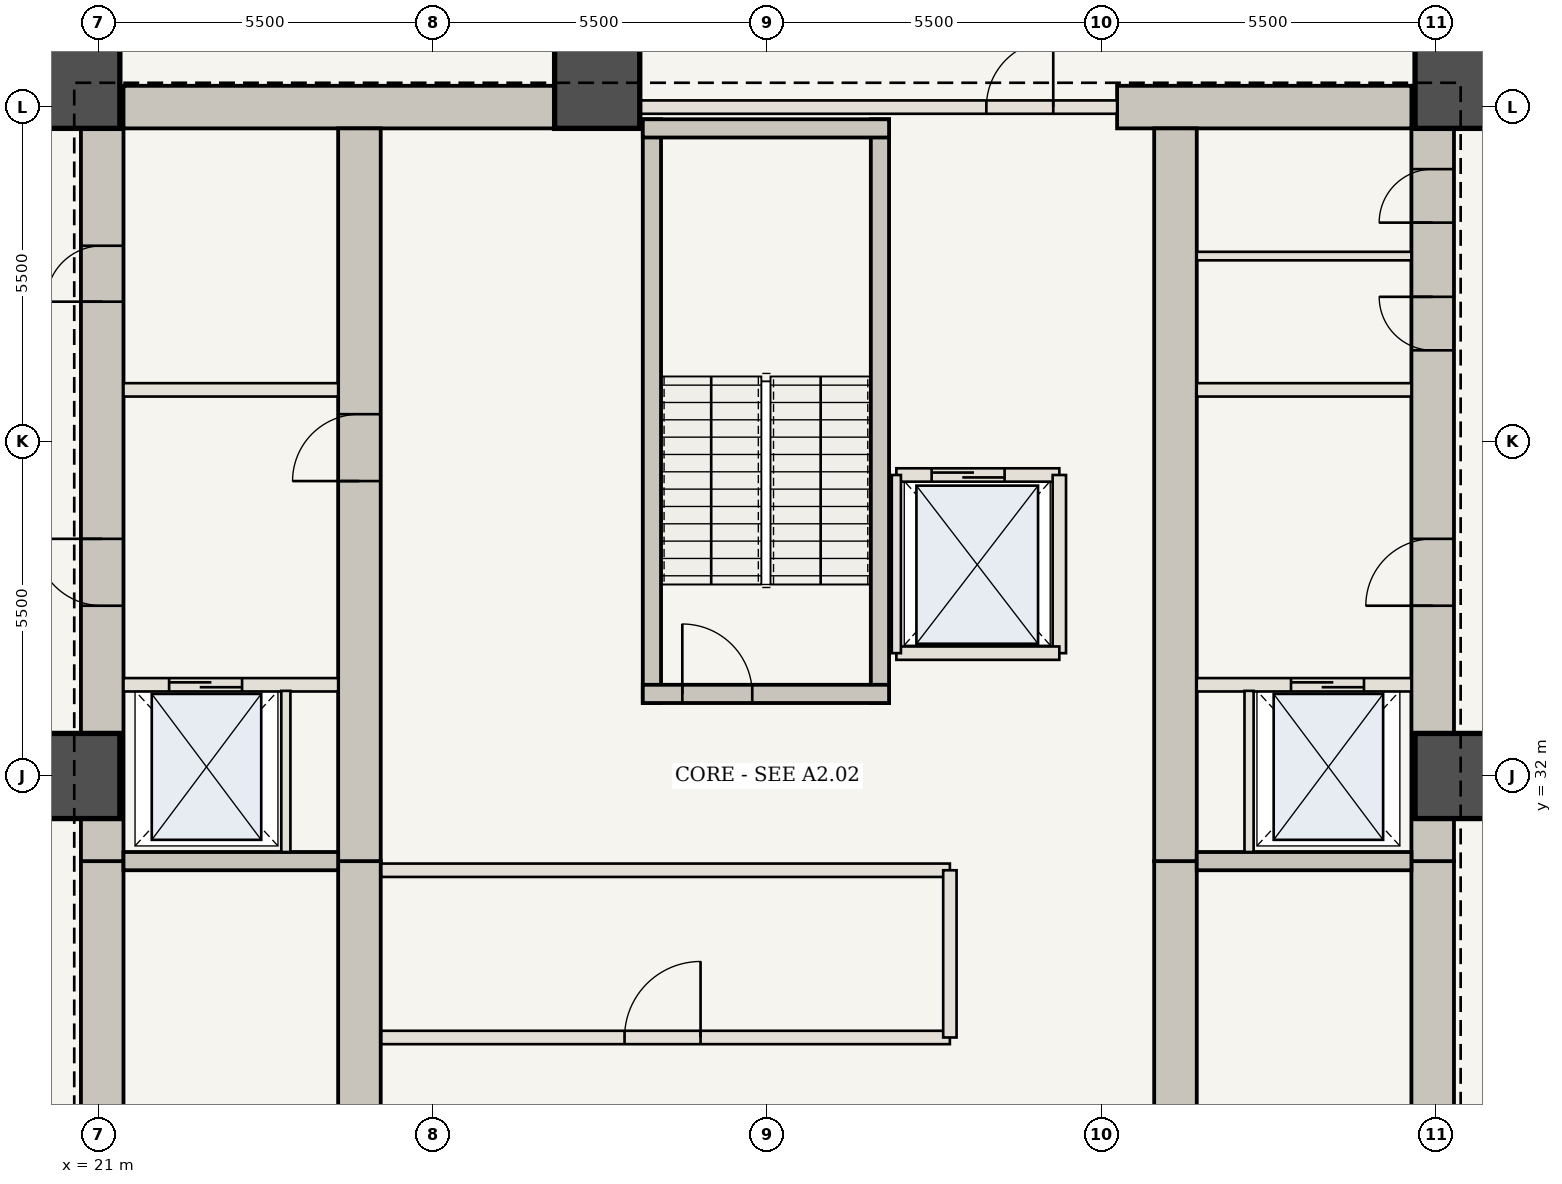
"""IFC4 building model, lengths in metres.
Left out: names, types, materials, properties, quantities, classifications, styles, units other than length and angle.
Written with IfcOpenShell. Run it as: python <this file> out.ifc"""

import sys

from ifc_helpers import new_model, si_unit, direction, frame, frame_2d, origin, origin_2d, place, context, subcontext, project, spatial, rectangle, extrude, element, fill, save


model = new_model("IFC4")
c1 = context("Model", 3, precision=1e-05, world=origin(), true_north=direction((0.0, 1.0)))
c2 = subcontext(c1, "Body", "Model", "MODEL_VIEW")
j1 = project(units=[si_unit("LENGTHUNIT", "METRE"), si_unit("PLANEANGLEUNIT", "RADIAN")], contexts=[c1])
p1 = place(None, origin())
s1 = spatial("IfcSite", under=j1, at=p1, CompositionType="ELEMENT")
p2 = place(p1, origin())
s2 = spatial("IfcBuilding", under=s1, at=p2, CompositionType="ELEMENT")
p3 = place(p2, frame((0.0, 0.0, -4.55)))
s3 = spatial("IfcBuildingStorey", under=s2, at=p3, CompositionType="ELEMENT", Elevation=-4.55)
p4 = place(p3, frame((21.06, 20.6, 0.0), z_axis=(0.0, 0.0, 1.0), x_axis=(0.0, 1.0, 0.0)))
e1 = element("IfcWall", 1, at=p4, inside=s3, PredefinedType="SHEAR", context=c2, shape_type="SweptSolid", body=[
    extrude(rectangle(XDim=10.0, YDim=0.7, at=frame_2d((5.0, 0.0))), origin(), (0.0, 0.0, 1.0), 4.55),
])
p5 = place(p4, frame((1.15, 0.0, 0.0)))
e2 = element("IfcOpeningElement", 2, at=p5, cuts=e1, PredefinedType="OPENING", context=c2, shape_type="SweptSolid", body=[
    extrude(rectangle(XDim=1.15, YDim=2.15, at=frame_2d((0.575, 1.075))), frame((0.0, 0.36, 0.0), z_axis=(0.0, -1.0, 0.0), x_axis=(1.0, 0.0, 0.0)), (0.0, 0.0, 1.0), 0.72),
])
p6 = place(p3, frame((21.06, 30.6, 0.0), z_axis=(0.0, 0.0, 1.0), x_axis=(0.0, 1.0, 0.0)))
e3 = element("IfcWall", 3, at=p6, inside=s3, PredefinedType="SHEAR", context=c2, shape_type="SweptSolid", body=[
    extrude(rectangle(XDim=12.75, YDim=0.7, at=frame_2d((6.375, 0.0))), origin(), (0.0, 0.0, 1.0), 4.55),
])
p7 = place(p6, frame((4.2, 0.0, 0.0)))
e4 = element("IfcOpeningElement", 4, at=p7, cuts=e3, PredefinedType="OPENING", context=c2, shape_type="SweptSolid", body=[
    extrude(rectangle(XDim=1.1, YDim=2.15, at=frame_2d((0.55, 1.075))), frame((0.0, 0.36, 0.0), z_axis=(0.0, -1.0, 0.0), x_axis=(1.0, 0.0, 0.0)), (0.0, 0.0, 1.0), 0.72),
])
p8 = place(p6, frame((9.2, 0.0, 0.0)))
e5 = element("IfcOpeningElement", 5, at=p8, cuts=e3, PredefinedType="OPENING", context=c2, shape_type="SweptSolid", body=[
    extrude(rectangle(XDim=0.92, YDim=2.1, at=frame_2d((0.46, 1.05))), frame((0.0, 0.36, 0.0), z_axis=(0.0, -1.0, 0.0), x_axis=(1.0, 0.0, 0.0)), (0.0, 0.0, 1.0), 0.72),
])
p9 = place(p3, frame((42.94, 20.6, 0.0), z_axis=(0.0, 0.0, 1.0), x_axis=(0.0, 1.0, 0.0)))
e6 = element("IfcWall", 6, at=p9, inside=s3, PredefinedType="SHEAR", context=c2, shape_type="SweptSolid", body=[
    extrude(rectangle(XDim=10.0, YDim=0.7, at=frame_2d((5.0, 0.0))), origin(), (0.0, 0.0, 1.0), 4.55),
])
p10 = place(p9, frame((1.15, 0.0, 0.0)))
e7 = element("IfcOpeningElement", 7, at=p10, cuts=e6, PredefinedType="OPENING", context=c2, shape_type="SweptSolid", body=[
    extrude(rectangle(XDim=1.15, YDim=2.15, at=frame_2d((0.575, 1.075))), frame((0.0, 0.36, 0.0), z_axis=(0.0, -1.0, 0.0), x_axis=(1.0, 0.0, 0.0)), (0.0, 0.0, 1.0), 0.72),
])
p11 = place(p3, frame((42.94, 30.6, 0.0), z_axis=(0.0, 0.0, 1.0), x_axis=(0.0, 1.0, 0.0)))
e8 = element("IfcWall", 8, at=p11, inside=s3, PredefinedType="SHEAR", context=c2, shape_type="SweptSolid", body=[
    extrude(rectangle(XDim=12.75, YDim=0.7, at=frame_2d((6.375, 0.0))), origin(), (0.0, 0.0, 1.0), 4.55),
])
p12 = place(p11, frame((4.2, 0.0, 0.0)))
e9 = element("IfcOpeningElement", 9, at=p12, cuts=e8, PredefinedType="OPENING", context=c2, shape_type="SweptSolid", body=[
    extrude(rectangle(XDim=1.1, YDim=2.15, at=frame_2d((0.55, 1.075))), frame((0.0, 0.36, 0.0), z_axis=(0.0, -1.0, 0.0), x_axis=(1.0, 0.0, 0.0)), (0.0, 0.0, 1.0), 0.72),
])
p13 = place(p11, frame((8.4, 0.0, 0.0)))
e10 = element("IfcOpeningElement", 10, at=p13, cuts=e8, PredefinedType="OPENING", context=c2, shape_type="SweptSolid", body=[
    extrude(rectangle(XDim=0.88, YDim=2.1, at=frame_2d((0.44, 1.05))), frame((0.0, 0.36, 0.0), z_axis=(0.0, -1.0, 0.0), x_axis=(1.0, 0.0, 0.0)), (0.0, 0.0, 1.0), 0.72),
])
p14 = place(p11, frame((10.5, 0.0, 0.0)))
e11 = element("IfcOpeningElement", 11, at=p14, cuts=e8, PredefinedType="OPENING", context=c2, shape_type="SweptSolid", body=[
    extrude(rectangle(XDim=0.88, YDim=2.1, at=frame_2d((0.44, 1.05))), frame((0.0, 0.36, 0.0), z_axis=(0.0, -1.0, 0.0), x_axis=(1.0, 0.0, 0.0)), (0.0, 0.0, 1.0), 0.72),
])
p15 = place(p3, frame((21.41, 43.0, 0.0), z_axis=(0.0, 0.0, 1.0), x_axis=(1.0, 0.0, 0.0)))
e12 = element("IfcWall", 12, at=p15, inside=s3, PredefinedType="SHEAR", context=c2, shape_type="SweptSolid", body=[
    extrude(rectangle(XDim=8.24, YDim=0.7, at=frame_2d((4.12, 0.0))), origin(), (0.0, 0.0, 1.0), 4.55),
])
p16 = place(p3, frame((37.75, 43.0, 0.0), z_axis=(0.0, 0.0, 1.0), x_axis=(1.0, 0.0, 0.0)))
e13 = element("IfcWall", 13, at=p16, inside=s3, PredefinedType="SHEAR", context=c2, shape_type="SweptSolid", body=[
    extrude(rectangle(XDim=4.84, YDim=0.7, at=frame_2d((2.42, 0.0))), origin(), (0.0, 0.0, 1.0), 4.55),
])
p17 = place(p3, frame((25.29, 21.3, 0.0), z_axis=(0.0, 0.0, 1.0), x_axis=(0.0, 1.0, 0.0)))
e14 = element("IfcWall", 14, at=p17, inside=s3, PredefinedType="SHEAR", context=c2, shape_type="SweptSolid", body=[
    extrude(rectangle(XDim=9.3, YDim=0.7, at=frame_2d((4.65, 0.0))), origin(), (0.0, 0.0, 1.0), 4.55),
])
p18 = place(p3, frame((25.29, 30.6, 0.0), z_axis=(0.0, 0.0, 1.0), x_axis=(0.0, 1.0, 0.0)))
e15 = element("IfcWall", 15, at=p18, inside=s3, PredefinedType="SHEAR", context=c2, shape_type="SweptSolid", body=[
    extrude(rectangle(XDim=12.05, YDim=0.7, at=frame_2d((6.025, 0.0))), origin(), (0.0, 0.0, 1.0), 4.55),
])
p19 = place(p18, frame((6.25, 0.0, 0.0)))
e16 = element("IfcOpeningElement", 16, at=p19, cuts=e15, PredefinedType="OPENING", context=c2, shape_type="SweptSolid", body=[
    extrude(rectangle(XDim=1.1, YDim=2.15, at=frame_2d((0.55, 1.075))), frame((0.0, 0.36, 0.0), z_axis=(0.0, -1.0, 0.0), x_axis=(1.0, 0.0, 0.0)), (0.0, 0.0, 1.0), 0.72),
])
p20 = place(p3, frame((38.71, 21.3, 0.0), z_axis=(0.0, 0.0, 1.0), x_axis=(0.0, 1.0, 0.0)))
e17 = element("IfcWall", 17, at=p20, inside=s3, PredefinedType="SHEAR", context=c2, shape_type="SweptSolid", body=[
    extrude(rectangle(XDim=9.3, YDim=0.7, at=frame_2d((4.65, 0.0))), origin(), (0.0, 0.0, 1.0), 4.55),
])
p21 = place(p3, frame((38.71, 30.6, 0.0), z_axis=(0.0, 0.0, 1.0), x_axis=(0.0, 1.0, 0.0)))
e18 = element("IfcWall", 18, at=p21, inside=s3, PredefinedType="SHEAR", context=c2, shape_type="SweptSolid", body=[
    extrude(rectangle(XDim=12.05, YDim=0.7, at=frame_2d((6.025, 0.0))), origin(), (0.0, 0.0, 1.0), 4.55),
])
for number, where, z_axis, x_axis in (
    (19, (43.35, 32.0, 0.0), (0.0, 0.0, 1.0), (1.0, 0.0, 0.0)),
    (20, (43.35, 43.35, 0.0), (0.0, 0.0, 1.0), (1.0, 0.0, 0.0)),
    (21, (29.2, 43.35, 0.0), (0.0, 0.0, 1.0), (1.0, 0.0, 0.0)),
    (22, (20.65, 43.35, 0.0), (0.0, 0.0, 1.0), (1.0, 0.0, 0.0)),
    (23, (20.65, 32.0, 0.0), (0.0, 0.0, 1.0), (1.0, 0.0, 0.0)),
):
    element("IfcColumn", number, at=place(p3, frame(where, z_axis=z_axis, x_axis=x_axis)), inside=s3, PredefinedType="COLUMN", context=c2, shape_type="SweptSolid", body=[
        extrude(rectangle(XDim=1.4, YDim=1.4, at=origin_2d()), origin(), (0.0, 0.0, 1.0), 4.55),
    ])
for number, where, z_axis, x_axis in (
    (24, (21.41, 30.6, 0.0), (0.0, 0.0, 1.0), (1.0, 0.0, 0.0)),
    (25, (39.06, 30.6, 0.0), (0.0, 0.0, 1.0), (1.0, 0.0, 0.0)),
):
    element("IfcWall", number, at=place(p3, frame(where, z_axis=z_axis, x_axis=x_axis)), inside=s3, PredefinedType="SHEAR", context=c2, shape_type="SweptSolid", body=[
        extrude(rectangle(XDim=3.53, YDim=0.3, at=frame_2d((1.765, 0.0))), origin(), (0.0, 0.0, 1.0), 4.23),
    ])
p22 = place(p3, frame((21.41, 33.5, 0.0), z_axis=(0.0, 0.0, 1.0), x_axis=(1.0, 0.0, 0.0)))
e26 = element("IfcWall", 26, at=p22, inside=s3, PredefinedType="STANDARD", context=c2, shape_type="SweptSolid", body=[
    extrude(rectangle(XDim=3.53, YDim=0.22, at=frame_2d((1.765, 0.0))), origin(), (0.0, 0.0, 1.0), 4.23),
])
p23 = place(p22, frame((0.75, 0.0, 0.0)))
e27 = element("IfcOpeningElement", 27, at=p23, cuts=e26, PredefinedType="OPENING", context=c2, shape_type="SweptSolid", body=[
    extrude(rectangle(XDim=1.2, YDim=2.2, at=frame_2d((0.6, 1.1))), frame((0.0, 0.12, 0.0), z_axis=(0.0, -1.0, 0.0), x_axis=(1.0, 0.0, 0.0)), (0.0, 0.0, 1.0), 0.24),
])
p24 = place(p3, frame((24.08, 30.75, 0.0), z_axis=(0.0, 0.0, 1.0), x_axis=(0.0, 1.0, 0.0)))
e28 = element("IfcWall", 28, at=p24, inside=s3, PredefinedType="STANDARD", context=c2, shape_type="SweptSolid", body=[
    extrude(rectangle(XDim=2.65, YDim=0.15, at=frame_2d((1.325, 0.0))), origin(), (0.0, 0.0, 1.0), 4.23),
])
p25 = place(p3, frame((39.06, 33.5, 0.0), z_axis=(0.0, 0.0, 1.0), x_axis=(1.0, 0.0, 0.0)))
e29 = element("IfcWall", 29, at=p25, inside=s3, PredefinedType="STANDARD", context=c2, shape_type="SweptSolid", body=[
    extrude(rectangle(XDim=3.53, YDim=0.22, at=frame_2d((1.765, 0.0))), origin(), (0.0, 0.0, 1.0), 4.23),
])
p26 = place(p25, frame((1.55, 0.0, 0.0)))
e30 = element("IfcOpeningElement", 30, at=p26, cuts=e29, PredefinedType="OPENING", context=c2, shape_type="SweptSolid", body=[
    extrude(rectangle(XDim=1.2, YDim=2.2, at=frame_2d((0.6, 1.1))), frame((0.0, 0.12, 0.0), z_axis=(0.0, -1.0, 0.0), x_axis=(1.0, 0.0, 0.0)), (0.0, 0.0, 1.0), 0.24),
])
p27 = place(p3, frame((39.92, 30.75, 0.0), z_axis=(0.0, 0.0, 1.0), x_axis=(0.0, 1.0, 0.0)))
e31 = element("IfcWall", 31, at=p27, inside=s3, PredefinedType="STANDARD", context=c2, shape_type="SweptSolid", body=[
    extrude(rectangle(XDim=2.65, YDim=0.15, at=frame_2d((1.325, 0.0))), origin(), (0.0, 0.0, 1.0), 4.23),
])
for number, where, z_axis, x_axis in (
    (32, (21.41, 38.35, 0.0), (0.0, 0.0, 1.0), (1.0, 0.0, 0.0)),
    (33, (39.06, 38.35, 0.0), (0.0, 0.0, 1.0), (1.0, 0.0, 0.0)),
):
    element("IfcWall", number, at=place(p3, frame(where, z_axis=z_axis, x_axis=x_axis)), inside=s3, PredefinedType="STANDARD", context=c2, shape_type="SweptSolid", body=[
        extrude(rectangle(XDim=3.53, YDim=0.22, at=frame_2d((1.765, 0.0))), origin(), (0.0, 0.0, 1.0), 4.23),
    ])
p28 = place(p3, frame((39.06, 40.55, 0.0), z_axis=(0.0, 0.0, 1.0), x_axis=(1.0, 0.0, 0.0)))
e34 = element("IfcWall", 34, at=p28, inside=s3, PredefinedType="STANDARD", context=c2, shape_type="SweptSolid", body=[
    extrude(rectangle(XDim=3.53, YDim=0.14, at=frame_2d((1.765, 0.0))), origin(), (0.0, 0.0, 1.0), 4.23),
])
p29 = place(p3, frame((25.65, 27.7, 0.0), z_axis=(0.0, 0.0, 1.0), x_axis=(1.0, 0.0, 0.0)))
e35 = element("IfcWall", 35, at=p29, inside=s3, PredefinedType="STANDARD", context=c2, shape_type="SweptSolid", body=[
    extrude(rectangle(XDim=9.35, YDim=0.22, at=frame_2d((4.675, 0.0))), origin(), (0.0, 0.0, 1.0), 4.23),
])
p30 = place(p29, frame((4.0, 0.0, 0.0)))
e36 = element("IfcOpeningElement", 36, at=p30, cuts=e35, PredefinedType="OPENING", context=c2, shape_type="SweptSolid", body=[
    extrude(rectangle(XDim=1.25, YDim=2.2, at=frame_2d((0.625, 1.1))), frame((0.0, 0.12, 0.0), z_axis=(0.0, -1.0, 0.0), x_axis=(1.0, 0.0, 0.0)), (0.0, 0.0, 1.0), 0.24),
])
p31 = place(p3, frame((25.65, 30.45, 0.0), z_axis=(0.0, 0.0, 1.0), x_axis=(1.0, 0.0, 0.0)))
e37 = element("IfcWall", 37, at=p31, inside=s3, PredefinedType="STANDARD", context=c2, shape_type="SweptSolid", body=[
    extrude(rectangle(XDim=9.35, YDim=0.22, at=frame_2d((4.675, 0.0))), origin(), (0.0, 0.0, 1.0), 4.23),
])
p32 = place(p3, frame((35.0, 27.7, 0.0), z_axis=(0.0, 0.0, 1.0), x_axis=(0.0, 1.0, 0.0)))
e38 = element("IfcWall", 38, at=p32, inside=s3, PredefinedType="STANDARD", context=c2, shape_type="SweptSolid", body=[
    extrude(rectangle(XDim=2.75, YDim=0.22, at=frame_2d((1.375, 0.0))), origin(), (0.0, 0.0, 1.0), 4.23),
])
for number, where, z_axis, x_axis in (
    (39, (30.1, 33.2, 0.0), (0.0, 0.0, 1.0), (0.0, 1.0, 0.0)),
    (40, (33.85, 33.2, 0.0), (0.0, 0.0, 1.0), (0.0, 1.0, 0.0)),
):
    element("IfcWall", number, at=place(p3, frame(where, z_axis=z_axis, x_axis=x_axis)), inside=s3, PredefinedType="SHEAR", context=c2, shape_type="SweptSolid", body=[
        extrude(rectangle(XDim=9.6, YDim=0.3, at=frame_2d((4.8, 0.0))), origin(), (0.0, 0.0, 1.0), 4.23),
    ])
p33 = place(p3, frame((29.95, 33.35, 0.0), z_axis=(0.0, 0.0, 1.0), x_axis=(1.0, 0.0, 0.0)))
e41 = element("IfcWall", 41, at=p33, inside=s3, PredefinedType="SHEAR", context=c2, shape_type="SweptSolid", body=[
    extrude(rectangle(XDim=4.05, YDim=0.3, at=frame_2d((2.025, 0.0))), origin(), (0.0, 0.0, 1.0), 4.23),
])
p34 = place(p33, frame((0.65, 0.0, 0.0)))
e42 = element("IfcOpeningElement", 42, at=p34, cuts=e41, PredefinedType="OPENING", context=c2, shape_type="SweptSolid", body=[
    extrude(rectangle(XDim=1.15, YDim=2.15, at=frame_2d((0.575, 1.075))), frame((0.0, 0.16, 0.0), z_axis=(0.0, -1.0, 0.0), x_axis=(1.0, 0.0, 0.0)), (0.0, 0.0, 1.0), 0.32),
])
p35 = place(p3, frame((29.95, 42.65, 0.0), z_axis=(0.0, 0.0, 1.0), x_axis=(1.0, 0.0, 0.0)))
e43 = element("IfcWall", 43, at=p35, inside=s3, PredefinedType="SHEAR", context=c2, shape_type="SweptSolid", body=[
    extrude(rectangle(XDim=4.05, YDim=0.3, at=frame_2d((2.025, 0.0))), origin(), (0.0, 0.0, 1.0), 4.23),
])
p36 = place(p3, frame((29.65, 43.0, 0.0), z_axis=(0.0, 0.0, 1.0), x_axis=(1.0, 0.0, 0.0)))
e44 = element("IfcWall", 44, at=p36, inside=s3, PredefinedType="STANDARD", context=c2, shape_type="SweptSolid", body=[
    extrude(rectangle(XDim=8.1, YDim=0.22, at=frame_2d((4.05, 0.0))), origin(), (0.0, 0.0, 1.0), 4.23),
])
p37 = place(p36, frame((5.95, 0.0, 0.0)))
e45 = element("IfcOpeningElement", 45, at=p37, cuts=e44, PredefinedType="OPENING", context=c2, shape_type="SweptSolid", body=[
    extrude(rectangle(XDim=1.1, YDim=2.15, at=frame_2d((0.55, 1.075))), frame((0.0, 0.12, 0.0), z_axis=(0.0, -1.0, 0.0), x_axis=(1.0, 0.0, 0.0)), (0.0, 0.0, 1.0), 0.24),
])
p38 = place(p3, frame((34.12, 36.95, 0.0), z_axis=(0.0, 0.0, 1.0), x_axis=(1.0, 0.0, 0.0)))
e46 = element("IfcWall", 46, at=p38, inside=s3, PredefinedType="STANDARD", context=c2, shape_type="SweptSolid", body=[
    extrude(rectangle(XDim=2.68, YDim=0.22, at=frame_2d((1.34, 0.0))), origin(), (0.0, 0.0, 1.0), 4.23),
])
p39 = place(p38, frame((0.58, 0.0, 0.0)))
e47 = element("IfcOpeningElement", 47, at=p39, cuts=e46, PredefinedType="OPENING", context=c2, shape_type="SweptSolid", body=[
    extrude(rectangle(XDim=1.2, YDim=2.2, at=frame_2d((0.6, 1.1))), frame((0.0, 0.12, 0.0), z_axis=(0.0, -1.0, 0.0), x_axis=(1.0, 0.0, 0.0)), (0.0, 0.0, 1.0), 0.24),
])
p40 = place(p3, frame((36.8, 34.02, 0.0), z_axis=(0.0, 0.0, 1.0), x_axis=(0.0, 1.0, 0.0)))
e48 = element("IfcWall", 48, at=p40, inside=s3, PredefinedType="STANDARD", context=c2, shape_type="SweptSolid", body=[
    extrude(rectangle(XDim=2.93, YDim=0.22, at=frame_2d((1.465, 0.0))), origin(), (0.0, 0.0, 1.0), 4.23),
])
p41 = place(p3, frame((34.12, 34.02, 0.0), z_axis=(0.0, 0.0, 1.0), x_axis=(1.0, 0.0, 0.0)))
e49 = element("IfcWall", 49, at=p41, inside=s3, PredefinedType="STANDARD", context=c2, shape_type="SweptSolid", body=[
    extrude(rectangle(XDim=2.68, YDim=0.22, at=frame_2d((1.34, 0.0))), origin(), (0.0, 0.0, 1.0), 4.23),
])
p42 = place(p3, frame((34.12, 34.02, 0.0), z_axis=(0.0, 0.0, 1.0), x_axis=(0.0, 1.0, 0.0)))
e50 = element("IfcWall", 50, at=p42, inside=s3, PredefinedType="STANDARD", context=c2, shape_type="SweptSolid", body=[
    extrude(rectangle(XDim=2.93, YDim=0.15, at=frame_2d((1.465, 0.0))), origin(), (0.0, 0.0, 1.0), 4.23),
])
p43 = place(p7, origin())
e51 = element("IfcDoor", 51, at=p43, inside=s3, OperationType="SINGLE_SWING_RIGHT", PredefinedType="DOOR", context=c2, shape_type="SweptSolid", body=[
    extrude(rectangle(XDim=1.1, YDim=2.15, at=frame_2d((0.55, 1.075))), frame((0.0, 0.025, 0.0), z_axis=(0.0, -1.0, 0.0), x_axis=(1.0, 0.0, 0.0)), (0.0, 0.0, 1.0), 0.05),
])
fill(e4, e51)
p44 = place(p12, origin())
e52 = element("IfcDoor", 52, at=p44, inside=s3, OperationType="SINGLE_SWING_LEFT", PredefinedType="DOOR", context=c2, shape_type="SweptSolid", body=[
    extrude(rectangle(XDim=1.1, YDim=2.15, at=frame_2d((0.55, 1.075))), frame((0.0, 0.025, 0.0), z_axis=(0.0, -1.0, 0.0), x_axis=(1.0, 0.0, 0.0)), (0.0, 0.0, 1.0), 0.05),
])
fill(e9, e52)
p45 = place(p19, origin())
e53 = element("IfcDoor", 53, at=p45, inside=s3, OperationType="SINGLE_SWING_LEFT", PredefinedType="DOOR", context=c2, shape_type="SweptSolid", body=[
    extrude(rectangle(XDim=1.1, YDim=2.15, at=frame_2d((0.55, 1.075))), frame((0.0, 0.025, 0.0), z_axis=(0.0, -1.0, 0.0), x_axis=(1.0, 0.0, 0.0)), (0.0, 0.0, 1.0), 0.05),
])
fill(e16, e53)
p46 = place(p8, origin())
e54 = element("IfcDoor", 54, at=p46, inside=s3, OperationType="SINGLE_SWING_LEFT", PredefinedType="DOOR", context=c2, shape_type="SweptSolid", body=[
    extrude(rectangle(XDim=0.92, YDim=2.1, at=frame_2d((0.46, 1.05))), frame((0.0, 0.025, 0.0), z_axis=(0.0, -1.0, 0.0), x_axis=(1.0, 0.0, 0.0)), (0.0, 0.0, 1.0), 0.05),
])
fill(e5, e54)
p47 = place(p13, origin())
e55 = element("IfcDoor", 55, at=p47, inside=s3, OperationType="SINGLE_SWING_RIGHT", PredefinedType="DOOR", context=c2, shape_type="SweptSolid", body=[
    extrude(rectangle(XDim=0.88, YDim=2.1, at=frame_2d((0.44, 1.05))), frame((0.0, 0.025, 0.0), z_axis=(0.0, -1.0, 0.0), x_axis=(1.0, 0.0, 0.0)), (0.0, 0.0, 1.0), 0.05),
])
fill(e10, e55)
p48 = place(p14, origin())
e56 = element("IfcDoor", 56, at=p48, inside=s3, OperationType="SINGLE_SWING_LEFT", PredefinedType="DOOR", context=c2, shape_type="SweptSolid", body=[
    extrude(rectangle(XDim=0.88, YDim=2.1, at=frame_2d((0.44, 1.05))), frame((0.0, 0.025, 0.0), z_axis=(0.0, -1.0, 0.0), x_axis=(1.0, 0.0, 0.0)), (0.0, 0.0, 1.0), 0.05),
])
fill(e11, e56)
p49 = place(p23, origin())
e57 = element("IfcDoor", 57, at=p49, inside=s3, OperationType="DOUBLE_DOOR_SLIDING", PredefinedType="DOOR", context=c2, shape_type="SweptSolid", body=[
    extrude(rectangle(XDim=1.2, YDim=2.2, at=frame_2d((0.6, 1.1))), frame((0.0, 0.025, 0.0), z_axis=(0.0, -1.0, 0.0), x_axis=(1.0, 0.0, 0.0)), (0.0, 0.0, 1.0), 0.05),
])
fill(e27, e57)
p50 = place(p26, origin())
e58 = element("IfcDoor", 58, at=p50, inside=s3, OperationType="DOUBLE_DOOR_SLIDING", PredefinedType="DOOR", context=c2, shape_type="SweptSolid", body=[
    extrude(rectangle(XDim=1.2, YDim=2.2, at=frame_2d((0.6, 1.1))), frame((0.0, 0.025, 0.0), z_axis=(0.0, -1.0, 0.0), x_axis=(1.0, 0.0, 0.0)), (0.0, 0.0, 1.0), 0.05),
])
fill(e30, e58)
p51 = place(p30, origin())
e59 = element("IfcDoor", 59, at=p51, inside=s3, OperationType="SINGLE_SWING_RIGHT", PredefinedType="DOOR", context=c2, shape_type="SweptSolid", body=[
    extrude(rectangle(XDim=1.25, YDim=2.2, at=frame_2d((0.625, 1.1))), frame((0.0, 0.025, 0.0), z_axis=(0.0, -1.0, 0.0), x_axis=(1.0, 0.0, 0.0)), (0.0, 0.0, 1.0), 0.05),
])
fill(e36, e59)
p52 = place(p34, origin())
e60 = element("IfcDoor", 60, at=p52, inside=s3, OperationType="SINGLE_SWING_LEFT", PredefinedType="DOOR", context=c2, shape_type="SweptSolid", body=[
    extrude(rectangle(XDim=1.15, YDim=2.15, at=frame_2d((0.575, 1.075))), frame((0.0, 0.025, 0.0), z_axis=(0.0, -1.0, 0.0), x_axis=(1.0, 0.0, 0.0)), (0.0, 0.0, 1.0), 0.05),
])
fill(e42, e60)
p53 = place(p37, origin())
e61 = element("IfcDoor", 61, at=p53, inside=s3, OperationType="SINGLE_SWING_RIGHT", PredefinedType="DOOR", context=c2, shape_type="SweptSolid", body=[
    extrude(rectangle(XDim=1.1, YDim=2.15, at=frame_2d((0.55, 1.075))), frame((0.0, 0.025, 0.0), z_axis=(0.0, -1.0, 0.0), x_axis=(1.0, 0.0, 0.0)), (0.0, 0.0, 1.0), 0.05),
])
fill(e45, e61)
p54 = place(p39, origin())
e62 = element("IfcDoor", 62, at=p54, inside=s3, OperationType="DOUBLE_DOOR_SLIDING", PredefinedType="DOOR", context=c2, shape_type="SweptSolid", body=[
    extrude(rectangle(XDim=1.2, YDim=2.2, at=frame_2d((0.6, 1.1))), frame((0.0, 0.025, 0.0), z_axis=(0.0, -1.0, 0.0), x_axis=(1.0, 0.0, 0.0)), (0.0, 0.0, 1.0), 0.05),
])
fill(e47, e62)
save(model, sys.argv[1])
